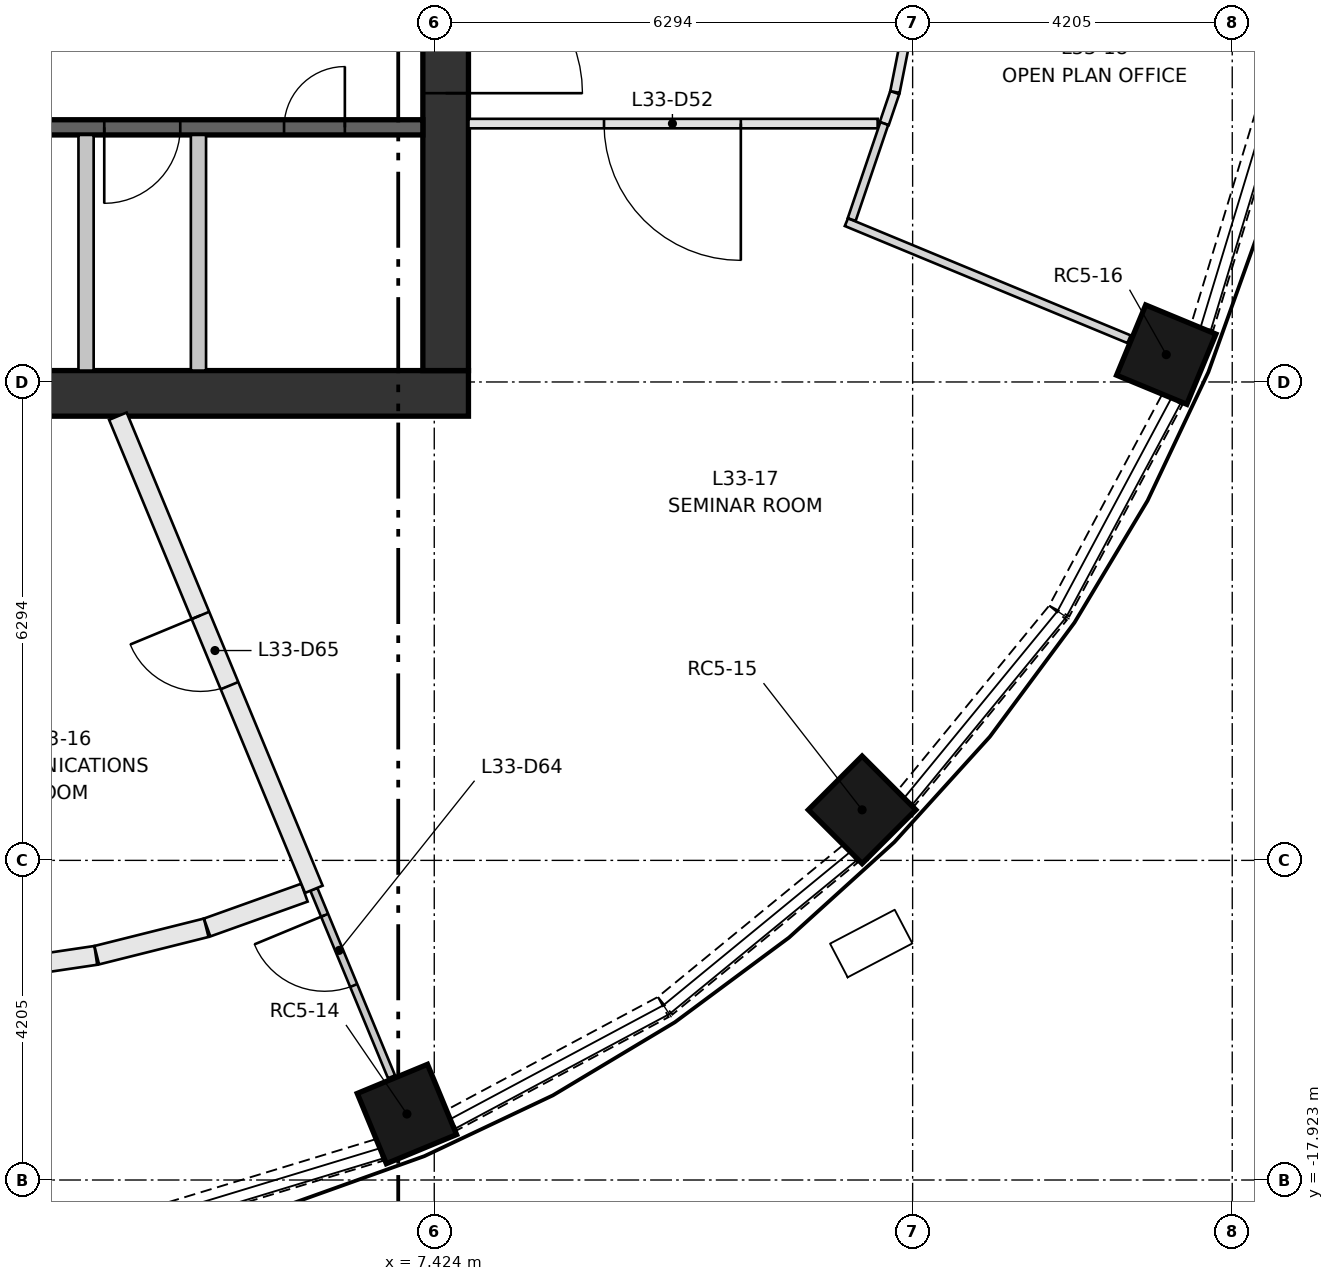
"""IFC4 building model, lengths in metres.
Left out: names, types, materials, properties, quantities, classifications, styles, units other than length and angle.
Written with IfcOpenShell. Run it as: python <this file> out.ifc"""

import sys

from ifc_helpers import new_model, si_unit, direction, frame, frame_2d, origin, origin_2d, place, context, subcontext, project, spatial, rectangle, extrude, element, fill, save


model = new_model("IFC4")
c1 = context("Model", 3, precision=1e-05, world=origin(), true_north=direction((0.0, 1.0)))
c2 = subcontext(c1, "Body", "Model", "MODEL_VIEW")
j1 = project(units=[si_unit("LENGTHUNIT", "METRE"), si_unit("PLANEANGLEUNIT", "RADIAN")], contexts=[c1])
p1 = place(None, origin())
s1 = spatial("IfcSite", under=j1, at=p1, CompositionType="ELEMENT")
p2 = place(p1, origin())
s2 = spatial("IfcBuilding", under=s1, at=p2, CompositionType="ELEMENT")
p3 = place(p2, frame((0.0, 0.0, 127.65)))
s3 = spatial("IfcBuildingStorey", under=s2, at=p3, CompositionType="ELEMENT", Elevation=127.65)
for number, where, z_axis, x_axis in (
    (1, (7.064, -17.055, 0.0), (0.0, 0.0, 1.0), (0.383, -0.924, 0.0)),
    (2, (13.053, -13.053, 0.0), (0.0, 0.0, 1.0), (0.707, -0.707, 0.0)),
    (3, (17.055, -7.064, 0.0), (0.0, 0.0, 1.0), (0.924, -0.383, 0.0)),
):
    element("IfcColumn", number, at=place(p3, frame(where, z_axis=z_axis, x_axis=x_axis)), inside=s3, PredefinedType="COLUMN", context=c2, shape_type="SweptSolid", body=[
        extrude(rectangle(XDim=1.0, YDim=1.0, at=origin_2d()), origin(), (0.0, 0.0, 1.0), 3.35),
    ])
p4 = place(p3, frame((-7.874, -7.574, 0.0), z_axis=(0.0, 0.0, 1.0), x_axis=(1.0, 0.0, 0.0)))
e4 = element("IfcWall", 4, at=p4, inside=s3, PredefinedType="SHEAR", context=c2, shape_type="SweptSolid", body=[
    extrude(rectangle(XDim=15.748, YDim=0.6, at=frame_2d((7.874, 0.0))), origin(), (0.0, 0.0, 1.0), 3.35),
])
p5 = place(p3, frame((7.574, -7.274, 0.0), z_axis=(0.0, 0.0, 1.0), x_axis=(0.0, 1.0, 0.0)))
e5 = element("IfcWall", 5, at=p5, inside=s3, PredefinedType="SHEAR", context=c2, shape_type="SweptSolid", body=[
    extrude(rectangle(XDim=14.548, YDim=0.6, at=frame_2d((7.274, 0.0))), origin(), (0.0, 0.0, 1.0), 3.35),
])
p6 = place(p5, frame((6.774, 0.0, 0.0)))
e6 = element("IfcOpeningElement", 6, at=p6, cuts=e5, PredefinedType="OPENING", context=c2, shape_type="SweptSolid", body=[
    extrude(rectangle(XDim=1.0, YDim=2.1, at=frame_2d((0.5, 1.05))), frame((0.0, 0.31, 0.0), z_axis=(0.0, -1.0, 0.0), x_axis=(1.0, 0.0, 0.0)), (0.0, 0.0, 1.0), 0.62),
])
p7 = place(p5, frame((3.649, 0.0, 0.0)))
e7 = element("IfcOpeningElement", 7, at=p7, cuts=e5, PredefinedType="OPENING", context=c2, shape_type="SweptSolid", body=[
    extrude(rectangle(XDim=1.8, YDim=2.1, at=frame_2d((0.9, 1.05))), frame((0.0, 0.31, 0.0), z_axis=(0.0, -1.0, 0.0), x_axis=(1.0, 0.0, 0.0)), (0.0, 0.0, 1.0), 0.62),
])
p8 = place(p5, frame((9.098, 0.0, 0.0)))
e8 = element("IfcOpeningElement", 8, at=p8, cuts=e5, PredefinedType="OPENING", context=c2, shape_type="SweptSolid", body=[
    extrude(rectangle(XDim=1.8, YDim=2.1, at=frame_2d((0.9, 1.05))), frame((0.0, 0.31, 0.0), z_axis=(0.0, -1.0, 0.0), x_axis=(1.0, 0.0, 0.0)), (0.0, 0.0, 1.0), 0.62),
])
p9 = place(p3, frame((-7.274, -4.074, 0.0), z_axis=(0.0, 0.0, 1.0), x_axis=(1.0, 0.0, 0.0)))
e9 = element("IfcWall", 9, at=p9, inside=s3, PredefinedType="SHEAR", context=c2, shape_type="SweptSolid", body=[
    extrude(rectangle(XDim=14.548, YDim=0.2, at=frame_2d((7.274, 0.0))), origin(), (0.0, 0.0, 1.0), 3.0),
])
p10 = place(p9, frame((1.219, 0.0, 0.0)))
e10 = element("IfcOpeningElement", 10, at=p10, cuts=e9, PredefinedType="OPENING", context=c2, shape_type="SweptSolid", body=[
    extrude(rectangle(XDim=1.1, YDim=2.1, at=frame_2d((0.55, 1.05))), frame((0.0, 0.11, 0.0), z_axis=(0.0, -1.0, 0.0), x_axis=(1.0, 0.0, 0.0)), (0.0, 0.0, 1.0), 0.22),
])
p11 = place(p9, frame((4.355, 0.0, 0.0)))
e11 = element("IfcOpeningElement", 11, at=p11, cuts=e9, PredefinedType="OPENING", context=c2, shape_type="SweptSolid", body=[
    extrude(rectangle(XDim=1.1, YDim=2.1, at=frame_2d((0.55, 1.05))), frame((0.0, 0.11, 0.0), z_axis=(0.0, -1.0, 0.0), x_axis=(1.0, 0.0, 0.0)), (0.0, 0.0, 1.0), 0.22),
])
p12 = place(p9, frame((7.795, 0.0, 0.0)))
e12 = element("IfcOpeningElement", 12, at=p12, cuts=e9, PredefinedType="OPENING", context=c2, shape_type="SweptSolid", body=[
    extrude(rectangle(XDim=1.0, YDim=2.1, at=frame_2d((0.5, 1.05))), frame((0.0, 0.11, 0.0), z_axis=(0.0, -1.0, 0.0), x_axis=(1.0, 0.0, 0.0)), (0.0, 0.0, 1.0), 0.22),
])
p13 = place(p9, frame((10.356, 0.0, 0.0)))
e13 = element("IfcOpeningElement", 13, at=p13, cuts=e9, PredefinedType="OPENING", context=c2, shape_type="SweptSolid", body=[
    extrude(rectangle(XDim=1.0, YDim=2.1, at=frame_2d((0.5, 1.05))), frame((0.0, 0.11, 0.0), z_axis=(0.0, -1.0, 0.0), x_axis=(1.0, 0.0, 0.0)), (0.0, 0.0, 1.0), 0.22),
])
p14 = place(p9, frame((12.722, 0.0, 0.0)))
e14 = element("IfcOpeningElement", 14, at=p14, cuts=e9, PredefinedType="OPENING", context=c2, shape_type="SweptSolid", body=[
    extrude(rectangle(XDim=0.8, YDim=2.1, at=frame_2d((0.4, 1.05))), frame((0.0, 0.11, 0.0), z_axis=(0.0, -1.0, 0.0), x_axis=(1.0, 0.0, 0.0)), (0.0, 0.0, 1.0), 0.22),
])
for number, where, z_axis, x_axis in (
    (15, (2.843, -7.274, 0.0), (0.0, 0.0, 1.0), (0.0, 1.0, 0.0)),
    (16, (4.322, -7.274, 0.0), (0.0, 0.0, 1.0), (0.0, 1.0, 0.0)),
):
    element("IfcWall", number, at=place(p3, frame(where, z_axis=z_axis, x_axis=x_axis)), inside=s3, PredefinedType="PARTITIONING", context=c2, shape_type="SweptSolid", body=[
        extrude(rectangle(XDim=3.1, YDim=0.2, at=frame_2d((1.55, 0.0))), origin(), (0.0, 0.0, 1.0), 3.0),
    ])
p15 = place(p3, frame((3.683, -18.445, 0.0), z_axis=(0.0, 0.0, 1.0), x_axis=(0.956874051907, 0.290503096001, 0.0)))
e17 = element("IfcWall", 17, at=p15, inside=s3, PredefinedType="SOLIDWALL", context=c2, shape_type="SweptSolid", body=[
    extrude(rectangle(XDim=3.157, YDim=0.3, at=frame_2d((1.579, 0.0))), origin(), (0.0, 0.0, 1.0), 0.9),
])
p16 = place(p3, frame((7.654, -17.135, 0.0), z_axis=(0.0, 0.0, 1.0), x_axis=(0.881851238747, 0.471527722113, 0.0)))
e18 = element("IfcWall", 18, at=p16, inside=s3, PredefinedType="SOLIDWALL", context=c2, shape_type="SweptSolid", body=[
    extrude(rectangle(XDim=3.155, YDim=0.3, at=frame_2d((1.578, 0.0))), origin(), (0.0, 0.0, 1.0), 0.9),
])
for number, where, z_axis, x_axis in (
    (19, (10.462, -15.631, 0.0), (0.0, 0.0, 1.0), (0.773, 0.634, 0.0)),
    (20, (13.628, -12.902, 0.0), (0.0, 0.0, 1.0), (0.634, 0.773, 0.0)),
):
    element("IfcWall", number, at=place(p3, frame(where, z_axis=z_axis, x_axis=x_axis)), inside=s3, PredefinedType="SOLIDWALL", context=c2, shape_type="SweptSolid", body=[
        extrude(rectangle(XDim=3.157, YDim=0.3, at=frame_2d((1.578, 0.0))), origin(), (0.0, 0.0, 1.0), 0.9),
    ])
p17 = place(p3, frame((15.647, -10.437, 0.0), z_axis=(0.0, 0.0, 1.0), x_axis=(0.471527722113, 0.881851238747, 0.0)))
e21 = element("IfcWall", 21, at=p17, inside=s3, PredefinedType="SOLIDWALL", context=c2, shape_type="SweptSolid", body=[
    extrude(rectangle(XDim=3.155, YDim=0.3, at=frame_2d((1.578, 0.0))), origin(), (0.0, 0.0, 1.0), 0.9),
])
p18 = place(p3, frame((17.527, -6.705, 0.0), z_axis=(0.0, 0.0, 1.0), x_axis=(0.290503096001, 0.956874051907, 0.0)))
e22 = element("IfcWall", 22, at=p18, inside=s3, PredefinedType="SOLIDWALL", context=c2, shape_type="SweptSolid", body=[
    extrude(rectangle(XDim=3.157, YDim=0.3, at=frame_2d((1.579, 0.0))), origin(), (0.0, 0.0, 1.0), 0.9),
])
p19 = place(p3, frame((13.258, -4.024, 0.0), z_axis=(0.0, 0.0, 1.0), x_axis=(-1.0, 0.0, 0.0)))
e23 = element("IfcWall", 23, at=p19, inside=s3, PredefinedType="PARTITIONING", context=c2, shape_type="SweptSolid", body=[
    extrude(rectangle(XDim=5.384, YDim=0.125, at=frame_2d((2.692, 0.0))), origin(), (0.0, 0.0, 1.0), 3.0),
])
p20 = place(p19, frame((1.8, 0.0, 0.0)))
e24 = element("IfcOpeningElement", 24, at=p20, cuts=e23, PredefinedType="OPENING", context=c2, shape_type="SweptSolid", body=[
    extrude(rectangle(XDim=1.8, YDim=2.1, at=frame_2d((0.9, 1.05))), frame((0.0, 0.073, 0.0), z_axis=(0.0, -1.0, 0.0), x_axis=(1.0, 0.0, 0.0)), (0.0, 0.0, 1.0), 0.145),
])
p21 = place(p3, frame((13.483, -3.617, 0.0), z_axis=(0.0, 0.0, 1.0), x_axis=(-0.321160043658, -0.947024934391, 0.0)))
e25 = element("IfcWall", 25, at=p21, inside=s3, PredefinedType="PARTITIONING", context=c2, shape_type="SweptSolid", body=[
    extrude(rectangle(XDim=0.43, YDim=0.125, at=frame_2d((0.215, 0.0))), origin(), (0.0, 0.0, 1.0), 3.0),
])
p22 = place(p3, frame((13.84, -1.826, 0.0), z_axis=(0.0, 0.0, 1.0), x_axis=(-0.195134630283, -0.980776465901, 0.0)))
e26 = element("IfcWall", 26, at=p22, inside=s3, PredefinedType="PARTITIONING", context=c2, shape_type="SweptSolid", body=[
    extrude(rectangle(XDim=1.818, YDim=0.125, at=frame_2d((0.909, 0.0))), origin(), (0.0, 0.0, 1.0), 3.0),
])
p23 = place(p3, frame((1.502, -15.186, 0.0), z_axis=(0.0, 0.0, 1.0), x_axis=(0.989192869337, 0.146620146136, 0.0)))
e27 = element("IfcWall", 27, at=p23, inside=s3, PredefinedType="PARTITIONING", context=c2, shape_type="SweptSolid", body=[
    extrude(rectangle(XDim=1.485, YDim=0.25, at=frame_2d((0.743, 0.0))), origin(), (0.0, 0.0, 1.0), 3.0),
])
p24 = place(p3, frame((2.983, -14.965, 0.0), z_axis=(0.0, 0.0, 1.0), x_axis=(0.970026334084, 0.24299981725, 0.0)))
e28 = element("IfcWall", 28, at=p24, inside=s3, PredefinedType="PARTITIONING", context=c2, shape_type="SweptSolid", body=[
    extrude(rectangle(XDim=1.485, YDim=0.25, at=frame_2d((0.742, 0.0))), origin(), (0.0, 0.0, 1.0), 3.0),
])
p25 = place(p3, frame((4.436, -14.601, 0.0), z_axis=(0.0, 0.0, 1.0), x_axis=(0.941526469986, 0.336939024626, 0.0)))
e29 = element("IfcWall", 29, at=p25, inside=s3, PredefinedType="PARTITIONING", context=c2, shape_type="SweptSolid", body=[
    extrude(rectangle(XDim=1.36, YDim=0.25, at=frame_2d((0.68, 0.0))), origin(), (0.0, 0.0, 1.0), 3.0),
])
p26 = place(p3, frame((6.862, -16.565, 0.0), z_axis=(0.0, 0.0, 1.0), x_axis=(-0.382744787218, 0.923854116112, 0.0)))
e30 = element("IfcWall", 30, at=p26, inside=s3, PredefinedType="PARTITIONING", context=c2, shape_type="SweptSolid", body=[
    extrude(rectangle(XDim=2.67, YDim=0.1, at=frame_2d((1.335, 0.0))), origin(), (0.0, 0.0, 1.0), 3.0),
])
p27 = place(p26, frame((1.3, 0.0, 0.0)))
e31 = element("IfcOpeningElement", 31, at=p27, cuts=e30, PredefinedType="OPENING", context=c2, shape_type="SweptSolid", body=[
    extrude(rectangle(XDim=1.0, YDim=2.1, at=frame_2d((0.5, 1.05))), frame((0.0, 0.06, 0.0), z_axis=(0.0, -1.0, 0.0), x_axis=(1.0, 0.0, 0.0)), (0.0, 0.0, 1.0), 0.12),
])
p28 = place(p3, frame((5.84, -14.098, 0.0), z_axis=(0.0, 0.0, 1.0), x_axis=(-0.382671840259, 0.923884334034, 0.0)))
e32 = element("IfcWall", 32, at=p28, inside=s3, PredefinedType="PARTITIONING", context=c2, shape_type="SweptSolid", body=[
    extrude(rectangle(XDim=6.737, YDim=0.25, at=frame_2d((3.369, 0.0))), origin(), (0.0, 0.0, 1.0), 3.0),
])
p29 = place(p28, frame((2.9, 0.0, 0.0)))
e33 = element("IfcOpeningElement", 33, at=p29, cuts=e32, PredefinedType="OPENING", context=c2, shape_type="SweptSolid", body=[
    extrude(rectangle(XDim=1.0, YDim=2.1, at=frame_2d((0.5, 1.05))), frame((0.0, 0.135, 0.0), z_axis=(0.0, -1.0, 0.0), x_axis=(1.0, 0.0, 0.0)), (0.0, 0.0, 1.0), 0.27),
])
p30 = place(p3, frame((12.847, -5.321, 0.0), z_axis=(0.0, 0.0, 1.0), x_axis=(0.923877104161, -0.382689294869, 0.0)))
e34 = element("IfcWall", 34, at=p30, inside=s3, PredefinedType="PARTITIONING", context=c2, shape_type="SweptSolid", body=[
    extrude(rectangle(XDim=4.025, YDim=0.11, at=frame_2d((2.012, 0.0))), origin(), (0.0, 0.0, 1.0), 3.0),
])
p31 = place(p3, frame((13.345, -4.024, 0.0), z_axis=(0.0, 0.0, 1.0), x_axis=(-0.32144299332, -0.946928931888, 0.0)))
e35 = element("IfcWall", 35, at=p31, inside=s3, PredefinedType="PARTITIONING", context=c2, shape_type="SweptSolid", body=[
    extrude(rectangle(XDim=1.333, YDim=0.11, at=frame_2d((0.667, 0.0))), origin(), (0.0, 0.0, 1.0), 3.0),
])
p32 = place(p13, frame((1.0, 0.0, 0.0), z_axis=(0.0, 0.0, 1.0), x_axis=(-1.0, 0.0, 0.0)))
e36 = element("IfcDoor", 36, at=p32, inside=s3, OperationType="SINGLE_SWING_LEFT", PredefinedType="DOOR", context=c2, shape_type="SweptSolid", body=[
    extrude(rectangle(XDim=1.0, YDim=2.1, at=frame_2d((0.5, 1.05))), frame((0.0, 0.025, 0.0), z_axis=(0.0, -1.0, 0.0), x_axis=(1.0, 0.0, 0.0)), (0.0, 0.0, 1.0), 0.05),
])
fill(e13, e36)
p33 = place(p14, origin())
e37 = element("IfcDoor", 37, at=p33, inside=s3, OperationType="SINGLE_SWING_RIGHT", PredefinedType="DOOR", context=c2, shape_type="SweptSolid", body=[
    extrude(rectangle(XDim=0.8, YDim=2.1, at=frame_2d((0.4, 1.05))), frame((0.0, 0.025, 0.0), z_axis=(0.0, -1.0, 0.0), x_axis=(1.0, 0.0, 0.0)), (0.0, 0.0, 1.0), 0.05),
])
fill(e14, e37)
p34 = place(p7, frame((1.8, 0.0, 0.0), z_axis=(0.0, 0.0, 1.0), x_axis=(-1.0, 0.0, 0.0)))
e38 = element("IfcDoor", 38, at=p34, inside=s3, OperationType="DOUBLE_DOOR_SINGLE_SWING", PredefinedType="DOOR", context=c2, shape_type="SweptSolid", body=[
    extrude(rectangle(XDim=1.8, YDim=2.1, at=frame_2d((0.9, 1.05))), frame((0.0, 0.025, 0.0), z_axis=(0.0, -1.0, 0.0), x_axis=(1.0, 0.0, 0.0)), (0.0, 0.0, 1.0), 0.05),
])
fill(e7, e38)
p35 = place(p20, origin())
e39 = element("IfcDoor", 39, at=p35, inside=s3, OperationType="DOUBLE_DOOR_SINGLE_SWING", PredefinedType="DOOR", context=c2, shape_type="SweptSolid", body=[
    extrude(rectangle(XDim=1.8, YDim=2.1, at=frame_2d((0.9, 1.05))), frame((0.0, 0.025, 0.0), z_axis=(0.0, -1.0, 0.0), x_axis=(1.0, 0.0, 0.0)), (0.0, 0.0, 1.0), 0.05),
])
fill(e24, e39)
p36 = place(p27, origin())
e40 = element("IfcDoor", 40, at=p36, inside=s3, OperationType="SINGLE_SWING_RIGHT", PredefinedType="DOOR", context=c2, shape_type="SweptSolid", body=[
    extrude(rectangle(XDim=1.0, YDim=2.1, at=frame_2d((0.5, 1.05))), frame((0.0, 0.025, 0.0), z_axis=(0.0, -1.0, 0.0), x_axis=(1.0, 0.0, 0.0)), (0.0, 0.0, 1.0), 0.05),
])
fill(e31, e40)
p37 = place(p29, origin())
e41 = element("IfcDoor", 41, at=p37, inside=s3, OperationType="SINGLE_SWING_RIGHT", PredefinedType="DOOR", context=c2, shape_type="SweptSolid", body=[
    extrude(rectangle(XDim=1.0, YDim=2.1, at=frame_2d((0.5, 1.05))), frame((0.0, 0.025, 0.0), z_axis=(0.0, -1.0, 0.0), x_axis=(1.0, 0.0, 0.0)), (0.0, 0.0, 1.0), 0.05),
])
fill(e33, e41)
save(model, sys.argv[1])
